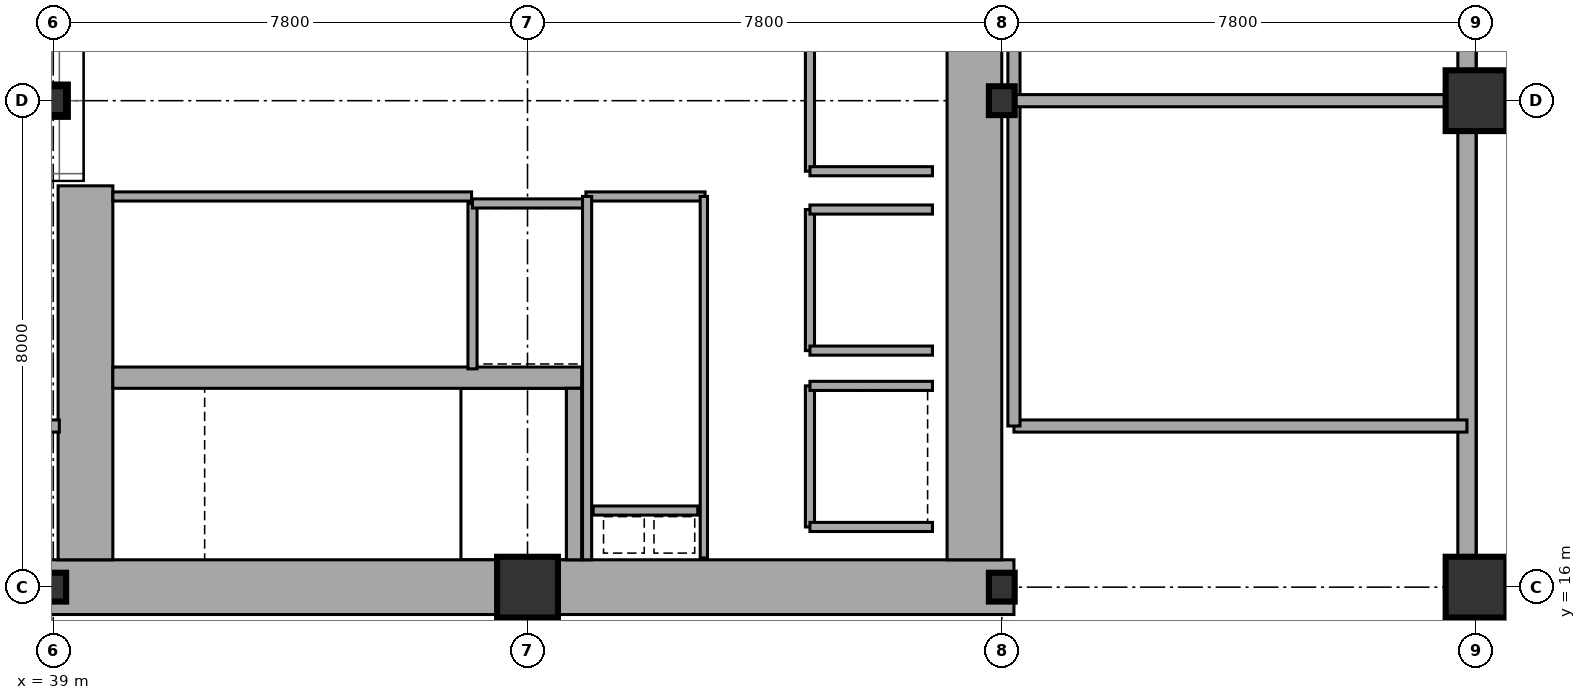
"""IFC4 building model, lengths in metres.
Left out: names, types, materials, properties, quantities, classifications, styles, units other than length and angle.
Written with IfcOpenShell. Run it as: python <this file> out.ifc"""

import sys

from ifc_helpers import new_model, si_unit, direction, frame, frame_2d, origin, origin_2d, place, context, subcontext, project, spatial, rectangle, i_section, extrude, element, fill, save


model = new_model("IFC4")
c1 = context("Model", 3, precision=1e-05, world=origin(), true_north=direction((0.0, 1.0)))
c2 = subcontext(c1, "Body", "Model", "MODEL_VIEW")
j1 = project(units=[si_unit("LENGTHUNIT", "METRE"), si_unit("PLANEANGLEUNIT", "RADIAN")], contexts=[c1])
p1 = place(None, origin())
s1 = spatial("IfcSite", under=j1, at=p1, CompositionType="ELEMENT")
p2 = place(p1, origin())
s2 = spatial("IfcBuilding", under=s1, at=p2, CompositionType="ELEMENT")
p3 = place(p2, origin())
s3 = spatial("IfcBuildingStorey", under=s2, at=p3, CompositionType="ELEMENT", Elevation=0.0)
p4 = place(p3, frame((38.8, 16.0, 0.0), z_axis=(0.0, 0.0, 1.0), x_axis=(1.0, 0.0, 0.0)))
e1 = element("IfcWall", 1, at=p4, inside=s3, PredefinedType="SHEAR", context=c2, shape_type="SweptSolid", body=[
    extrude(rectangle(XDim=16.0, YDim=0.9, at=frame_2d((8.0, 0.0))), origin(), (0.0, 0.0, 1.0), 5.12),
])
p5 = place(p3, frame((39.53, 16.45, 0.0), z_axis=(0.0, 0.0, 1.0), x_axis=(0.0, 1.0, 0.0)))
e2 = element("IfcWall", 2, at=p5, inside=s3, PredefinedType="SHEAR", context=c2, shape_type="SweptSolid", body=[
    extrude(rectangle(XDim=6.15, YDim=0.9, at=frame_2d((3.075, 0.0))), origin(), (0.0, 0.0, 1.0), 5.12),
])
p6 = place(p5, frame((0.35, 0.0, 0.0)))
e3 = element("IfcOpeningElement", 3, at=p6, cuts=e2, PredefinedType="OPENING", context=c2, shape_type="SweptSolid", body=[
    extrude(rectangle(XDim=1.1, YDim=2.15, at=frame_2d((0.55, 1.075))), frame((0.0, 0.46, 0.0), z_axis=(0.0, -1.0, 0.0), x_axis=(1.0, 0.0, 0.0)), (0.0, 0.0, 1.0), 0.92),
])
p7 = place(p3, frame((54.15, 16.45, 0.0), z_axis=(0.0, 0.0, 1.0), x_axis=(0.0, 1.0, 0.0)))
e4 = element("IfcWall", 4, at=p7, inside=s3, PredefinedType="SHEAR", context=c2, shape_type="SweptSolid", body=[
    extrude(rectangle(XDim=15.1, YDim=0.9, at=frame_2d((7.55, 0.0))), origin(), (0.0, 0.0, 1.0), 5.12),
])
p8 = place(p3, frame((39.98, 19.445, 0.0), z_axis=(0.0, 0.0, 1.0), x_axis=(1.0, 0.0, 0.0)))
e5 = element("IfcWall", 5, at=p8, inside=s3, PredefinedType="SHEAR", context=c2, shape_type="SweptSolid", body=[
    extrude(rectangle(XDim=7.71, YDim=0.35, at=frame_2d((3.855, 0.0))), origin(), (0.0, 0.0, 1.0), 5.12),
])
p9 = place(p8, frame((0.25, 0.0, 0.0)))
e6 = element("IfcOpeningElement", 6, at=p9, cuts=e5, PredefinedType="OPENING", context=c2, shape_type="SweptSolid", body=[
    extrude(rectangle(XDim=1.1, YDim=2.15, at=frame_2d((0.55, 1.075))), frame((0.0, 0.185, 0.0), z_axis=(0.0, -1.0, 0.0), x_axis=(1.0, 0.0, 0.0)), (0.0, 0.0, 1.0), 0.37),
])
p10 = place(p3, frame((47.565, 16.45, 0.0), z_axis=(0.0, 0.0, 1.0), x_axis=(0.0, 1.0, 0.0)))
e7 = element("IfcWall", 7, at=p10, inside=s3, PredefinedType="SHEAR", context=c2, shape_type="SweptSolid", body=[
    extrude(rectangle(XDim=2.82, YDim=0.25, at=frame_2d((1.41, 0.0))), origin(), (0.0, 0.0, 1.0), 5.12),
])
for number, where, z_axis, x_axis in (
    (8, (39.0, 16.0, 0.0), (0.0, 0.0, 1.0), (1.0, 0.0, 0.0)),
    (9, (39.0, 24.0, 0.0), (0.0, 0.0, 1.0), (1.0, 0.0, 0.0)),
):
    element("IfcColumn", number, at=place(p3, frame(where, z_axis=z_axis, x_axis=x_axis)), inside=s3, PredefinedType="COLUMN", context=c2, shape_type="SweptSolid", body=[
        extrude(i_section(OverallWidth=0.424, OverallDepth=0.474, WebThickness=0.048, FlangeThickness=0.077, at=origin_2d()), origin(), (0.0, 0.0, 1.0), 5.395),
    ])
p11 = place(p3, frame((46.8, 16.0, 0.0), z_axis=(0.0, 0.0, 1.0), x_axis=(1.0, 0.0, 0.0)))
e10 = element("IfcColumn", 10, at=p11, inside=s3, PredefinedType="COLUMN", context=c2, shape_type="SweptSolid", body=[
    extrude(rectangle(XDim=1.0, YDim=1.0, at=origin_2d()), origin(), (0.0, 0.0, 1.0), 5.395),
])
for number, where, z_axis, x_axis in (
    (11, (54.6, 16.0, 0.0), (0.0, 0.0, 1.0), (1.0, 0.0, 0.0)),
    (12, (54.6, 24.0, 0.0), (0.0, 0.0, 1.0), (1.0, 0.0, 0.0)),
):
    element("IfcColumn", number, at=place(p3, frame(where, z_axis=z_axis, x_axis=x_axis)), inside=s3, PredefinedType="COLUMN", context=c2, shape_type="SweptSolid", body=[
        extrude(i_section(OverallWidth=0.424, OverallDepth=0.474, WebThickness=0.048, FlangeThickness=0.077, at=origin_2d()), origin(), (0.0, 0.0, 1.0), 5.395),
    ])
for number, where, z_axis, x_axis in (
    (13, (62.4, 16.0, 0.0), (0.0, 0.0, 1.0), (1.0, 0.0, 0.0)),
    (14, (62.4, 24.0, 0.0), (0.0, 0.0, 1.0), (1.0, 0.0, 0.0)),
):
    element("IfcColumn", number, at=place(p3, frame(where, z_axis=z_axis, x_axis=x_axis)), inside=s3, PredefinedType="COLUMN", context=c2, shape_type="SweptSolid", body=[
        extrude(rectangle(XDim=1.0, YDim=1.0, at=origin_2d()), origin(), (0.0, 0.0, 1.0), 5.395),
    ])
p12 = place(p3, frame((62.25, 16.51, 0.0), z_axis=(0.0, 0.0, 1.0), x_axis=(0.0, 1.0, 0.0)))
e15 = element("IfcWall", 15, at=p12, inside=s3, PredefinedType="STANDARD", context=c2, shape_type="SweptSolid", body=[
    extrude(rectangle(XDim=6.98, YDim=0.3, at=frame_2d((3.49, 0.0))), origin(), (0.0, 0.0, 1.0), 4.648),
])
p13 = place(p12, frame((0.22, 0.0, 0.0)))
e16 = element("IfcOpeningElement", 16, at=p13, cuts=e15, PredefinedType="OPENING", context=c2, shape_type="SweptSolid", body=[
    extrude(rectangle(XDim=1.8, YDim=2.2, at=frame_2d((0.9, 1.1))), frame((0.0, 0.16, 0.0), z_axis=(0.0, -1.0, 0.0), x_axis=(1.0, 0.0, 0.0)), (0.0, 0.0, 1.0), 0.32),
])
p14 = place(p12, frame((3.4, 0.0, 0.0)))
e17 = element("IfcOpeningElement", 17, at=p14, cuts=e15, PredefinedType="OPENING", context=c2, shape_type="SweptSolid", body=[
    extrude(rectangle(XDim=1.8, YDim=2.2, at=frame_2d((0.9, 1.1))), frame((0.0, 0.16, 0.0), z_axis=(0.0, -1.0, 0.0), x_axis=(1.0, 0.0, 0.0)), (0.0, 0.0, 1.0), 0.32),
])
p15 = place(p3, frame((62.25, 24.51, 0.0), z_axis=(0.0, 0.0, 1.0), x_axis=(0.0, 1.0, 0.0)))
e18 = element("IfcWall", 18, at=p15, inside=s3, PredefinedType="STANDARD", context=c2, shape_type="SweptSolid", body=[
    extrude(rectangle(XDim=6.98, YDim=0.3, at=frame_2d((3.49, 0.0))), origin(), (0.0, 0.0, 1.0), 4.648),
])
p16 = place(p15, frame((4.55, 0.0, 0.0)))
e19 = element("IfcOpeningElement", 19, at=p16, cuts=e18, PredefinedType="OPENING", context=c2, shape_type="SweptSolid", body=[
    extrude(rectangle(XDim=1.8, YDim=2.2, at=frame_2d((0.9, 1.1))), frame((0.0, 0.16, 0.0), z_axis=(0.0, -1.0, 0.0), x_axis=(1.0, 0.0, 0.0)), (0.0, 0.0, 1.0), 0.32),
])
p17 = place(p3, frame((39.98, 22.425, 0.0), z_axis=(0.0, 0.0, 1.0), x_axis=(1.0, 0.0, 0.0)))
e20 = element("IfcWall", 20, at=p17, inside=s3, PredefinedType="PARTITIONING", context=c2, shape_type="SweptSolid", body=[
    extrude(rectangle(XDim=5.9, YDim=0.15, at=frame_2d((2.95, 0.0))), origin(), (0.0, 0.0, 1.0), 5.12),
])
p18 = place(p17, frame((2.35, 0.0, 0.0)))
e21 = element("IfcOpeningElement", 21, at=p18, cuts=e20, PredefinedType="OPENING", context=c2, shape_type="SweptSolid", body=[
    extrude(rectangle(XDim=1.05, YDim=2.15, at=frame_2d((0.525, 1.075))), frame((0.0, 0.085, 0.0), z_axis=(0.0, -1.0, 0.0), x_axis=(1.0, 0.0, 0.0)), (0.0, 0.0, 1.0), 0.17),
])
p19 = place(p3, frame((45.895, 19.59, 0.0), z_axis=(0.0, 0.0, 1.0), x_axis=(0.0, 1.0, 0.0)))
e22 = element("IfcWall", 22, at=p19, inside=s3, PredefinedType="PARTITIONING", context=c2, shape_type="SweptSolid", body=[
    extrude(rectangle(XDim=2.72, YDim=0.15, at=frame_2d((1.36, 0.0))), origin(), (0.0, 0.0, 1.0), 5.12),
])
p20 = place(p19, frame((0.81, 0.0, 0.0)))
e23 = element("IfcOpeningElement", 23, at=p20, cuts=e22, PredefinedType="OPENING", context=c2, shape_type="SweptSolid", body=[
    extrude(rectangle(XDim=1.1, YDim=2.15, at=frame_2d((0.55, 1.075))), frame((0.0, 0.085, 0.0), z_axis=(0.0, -1.0, 0.0), x_axis=(1.0, 0.0, 0.0)), (0.0, 0.0, 1.0), 0.17),
])
p21 = place(p3, frame((45.895, 22.31, 0.0), z_axis=(0.0, 0.0, 1.0), x_axis=(1.0, 0.0, 0.0)))
e24 = element("IfcWall", 24, at=p21, inside=s3, PredefinedType="PARTITIONING", context=c2, shape_type="SweptSolid", body=[
    extrude(rectangle(XDim=1.915, YDim=0.15, at=frame_2d((0.958, 0.0))), origin(), (0.0, 0.0, 1.0), 5.12),
])
p22 = place(p3, frame((51.445, 19.89, 0.0), z_axis=(0.0, 0.0, 1.0), x_axis=(0.0, 1.0, 0.0)))
e25 = element("IfcWall", 25, at=p22, inside=s3, PredefinedType="PARTITIONING", context=c2, shape_type="SweptSolid", body=[
    extrude(rectangle(XDim=2.32, YDim=0.15, at=frame_2d((1.16, 0.0))), origin(), (0.0, 0.0, 1.0), 5.12),
])
p23 = place(p22, frame((0.61, 0.0, 0.0)))
e26 = element("IfcOpeningElement", 26, at=p23, cuts=e25, PredefinedType="OPENING", context=c2, shape_type="SweptSolid", body=[
    extrude(rectangle(XDim=1.1, YDim=2.15, at=frame_2d((0.55, 1.075))), frame((0.0, 0.085, 0.0), z_axis=(0.0, -1.0, 0.0), x_axis=(1.0, 0.0, 0.0)), (0.0, 0.0, 1.0), 0.17),
])
for number, where, z_axis, x_axis in (
    (27, (51.445, 19.89, 0.0), (0.0, 0.0, 1.0), (1.0, 0.0, 0.0)),
    (28, (51.445, 22.21, 0.0), (0.0, 0.0, 1.0), (1.0, 0.0, 0.0)),
):
    element("IfcWall", number, at=place(p3, frame(where, z_axis=z_axis, x_axis=x_axis)), inside=s3, PredefinedType="PARTITIONING", context=c2, shape_type="SweptSolid", body=[
        extrude(rectangle(XDim=2.015, YDim=0.15, at=frame_2d((1.007, 0.0))), origin(), (0.0, 0.0, 1.0), 5.12),
    ])
p24 = place(p3, frame((51.445, 22.84, 0.0), z_axis=(0.0, 0.0, 1.0), x_axis=(0.0, 1.0, 0.0)))
e29 = element("IfcWall", 29, at=p24, inside=s3, PredefinedType="PARTITIONING", context=c2, shape_type="SweptSolid", body=[
    extrude(rectangle(XDim=2.32, YDim=0.15, at=frame_2d((1.16, 0.0))), origin(), (0.0, 0.0, 1.0), 5.12),
])
p25 = place(p24, frame((0.61, 0.0, 0.0)))
e30 = element("IfcOpeningElement", 30, at=p25, cuts=e29, PredefinedType="OPENING", context=c2, shape_type="SweptSolid", body=[
    extrude(rectangle(XDim=1.1, YDim=2.15, at=frame_2d((0.55, 1.075))), frame((0.0, 0.085, 0.0), z_axis=(0.0, -1.0, 0.0), x_axis=(1.0, 0.0, 0.0)), (0.0, 0.0, 1.0), 0.17),
])
p26 = place(p3, frame((51.445, 22.84, 0.0), z_axis=(0.0, 0.0, 1.0), x_axis=(1.0, 0.0, 0.0)))
e31 = element("IfcWall", 31, at=p26, inside=s3, PredefinedType="PARTITIONING", context=c2, shape_type="SweptSolid", body=[
    extrude(rectangle(XDim=2.015, YDim=0.15, at=frame_2d((1.007, 0.0))), origin(), (0.0, 0.0, 1.0), 5.12),
])
p27 = place(p3, frame((51.445, 16.99, 0.0), z_axis=(0.0, 0.0, 1.0), x_axis=(0.0, 1.0, 0.0)))
e32 = element("IfcWall", 32, at=p27, inside=s3, PredefinedType="PARTITIONING", context=c2, shape_type="SweptSolid", body=[
    extrude(rectangle(XDim=2.32, YDim=0.15, at=frame_2d((1.16, 0.0))), origin(), (0.0, 0.0, 1.0), 5.12),
])
p28 = place(p27, frame((0.61, 0.0, 0.0)))
e33 = element("IfcOpeningElement", 33, at=p28, cuts=e32, PredefinedType="OPENING", context=c2, shape_type="SweptSolid", body=[
    extrude(rectangle(XDim=1.1, YDim=2.15, at=frame_2d((0.55, 1.075))), frame((0.0, 0.085, 0.0), z_axis=(0.0, -1.0, 0.0), x_axis=(1.0, 0.0, 0.0)), (0.0, 0.0, 1.0), 0.17),
])
for number, where, z_axis, x_axis in (
    (34, (51.445, 16.99, 0.0), (0.0, 0.0, 1.0), (1.0, 0.0, 0.0)),
    (35, (51.445, 19.31, 0.0), (0.0, 0.0, 1.0), (1.0, 0.0, 0.0)),
):
    element("IfcWall", number, at=place(p3, frame(where, z_axis=z_axis, x_axis=x_axis)), inside=s3, PredefinedType="PARTITIONING", context=c2, shape_type="SweptSolid", body=[
        extrude(rectangle(XDim=2.015, YDim=0.15, at=frame_2d((1.007, 0.0))), origin(), (0.0, 0.0, 1.0), 5.12),
    ])
p29 = place(p3, frame((47.88, 17.26, 0.0), z_axis=(0.0, 0.0, 1.0), x_axis=(1.0, 0.0, 0.0)))
e36 = element("IfcWall", 36, at=p29, inside=s3, PredefinedType="PARTITIONING", context=c2, shape_type="SweptSolid", body=[
    extrude(rectangle(XDim=1.72, YDim=0.15, at=frame_2d((0.86, 0.0))), origin(), (0.0, 0.0, 1.0), 5.12),
])
p30 = place(p29, frame((0.42, 0.0, 0.0)))
e37 = element("IfcOpeningElement", 37, at=p30, cuts=e36, PredefinedType="OPENING", context=c2, shape_type="SweptSolid", body=[
    extrude(rectangle(XDim=0.85, YDim=2.15, at=frame_2d((0.425, 1.075))), frame((0.0, 0.085, 0.0), z_axis=(0.0, -1.0, 0.0), x_axis=(1.0, 0.0, 0.0)), (0.0, 0.0, 1.0), 0.17),
])
p31 = place(p3, frame((47.76, 22.425, 0.0), z_axis=(0.0, 0.0, 1.0), x_axis=(1.0, 0.0, 0.0)))
e38 = element("IfcWall", 38, at=p31, inside=s3, PredefinedType="PARTITIONING", context=c2, shape_type="SweptSolid", body=[
    extrude(rectangle(XDim=1.96, YDim=0.15, at=frame_2d((0.98, 0.0))), origin(), (0.0, 0.0, 1.0), 5.12),
])
p32 = place(p3, frame((47.78, 16.45, 0.0), z_axis=(0.0, 0.0, 1.0), x_axis=(0.0, 1.0, 0.0)))
e39 = element("IfcWall", 39, at=p32, inside=s3, PredefinedType="PARTITIONING", context=c2, shape_type="SweptSolid", body=[
    extrude(rectangle(XDim=5.975, YDim=0.15, at=frame_2d((2.988, 0.0))), origin(), (0.0, 0.0, 1.0), 5.12),
])
p33 = place(p3, frame((49.7, 16.48, 0.0), z_axis=(0.0, 0.0, 1.0), x_axis=(0.0, 1.0, 0.0)))
e40 = element("IfcWall", 40, at=p33, inside=s3, PredefinedType="PARTITIONING", context=c2, shape_type="SweptSolid", body=[
    extrude(rectangle(XDim=5.945, YDim=0.12, at=frame_2d((2.973, 0.0))), origin(), (0.0, 0.0, 1.0), 5.12),
])
p34 = place(p33, frame((3.35, 0.0, 0.0)))
e41 = element("IfcOpeningElement", 41, at=p34, cuts=e40, PredefinedType="OPENING", context=c2, shape_type="SweptSolid", body=[
    extrude(rectangle(XDim=0.95, YDim=2.15, at=frame_2d((0.475, 1.075))), frame((0.0, 0.07, 0.0), z_axis=(0.0, -1.0, 0.0), x_axis=(1.0, 0.0, 0.0)), (0.0, 0.0, 1.0), 0.14),
])
p35 = place(p3, frame((37.3, 18.65, 0.0), z_axis=(0.0, 0.0, 1.0), x_axis=(1.0, 0.0, 0.0)))
e42 = element("IfcWall", 42, at=p35, inside=s3, PredefinedType="SOLIDWALL", context=c2, shape_type="SweptSolid", body=[
    extrude(rectangle(XDim=1.8, YDim=0.2, at=frame_2d((0.9, 0.0))), origin(), (0.0, 0.0, 1.0), 4.415),
])
p36 = place(p3, frame((54.8, 18.65, 0.0), z_axis=(0.0, 0.0, 1.0), x_axis=(1.0, 0.0, 0.0)))
e43 = element("IfcWall", 43, at=p36, inside=s3, PredefinedType="SOLIDWALL", context=c2, shape_type="SweptSolid", body=[
    extrude(rectangle(XDim=7.45, YDim=0.2, at=frame_2d((3.725, 0.0))), origin(), (0.0, 0.0, 1.0), 5.12),
])
p37 = place(p3, frame((54.8, 18.65, 0.0), z_axis=(0.0, 0.0, 1.0), x_axis=(0.0, 1.0, 0.0)))
e44 = element("IfcWall", 44, at=p37, inside=s3, PredefinedType="SOLIDWALL", context=c2, shape_type="SweptSolid", body=[
    extrude(rectangle(XDim=9.95, YDim=0.2, at=frame_2d((4.975, 0.0))), origin(), (0.0, 0.0, 1.0), 4.338),
])
p38 = place(p3, frame((54.8, 24.0, 0.0), z_axis=(0.0, 0.0, 1.0), x_axis=(1.0, 0.0, 0.0)))
e45 = element("IfcWall", 45, at=p38, inside=s3, PredefinedType="SOLIDWALL", context=c2, shape_type="SweptSolid", body=[
    extrude(rectangle(XDim=7.45, YDim=0.2, at=frame_2d((3.725, 0.0))), origin(), (0.0, 0.0, 1.0), 4.338),
])
p39 = place(p38, frame((2.8, 0.0, 0.0)))
e46 = element("IfcOpeningElement", 46, at=p39, cuts=e45, PredefinedType="OPENING", context=c2, shape_type="SweptSolid", body=[
    extrude(rectangle(XDim=1.05, YDim=2.15, at=frame_2d((0.525, 1.075))), frame((0.0, 0.11, 0.0), z_axis=(0.0, -1.0, 0.0), x_axis=(1.0, 0.0, 0.0)), (0.0, 0.0, 1.0), 0.22),
])
p40 = place(p13, frame((1.8, 0.0, 0.0), z_axis=(0.0, 0.0, 1.0), x_axis=(-1.0, 0.0, 0.0)))
e47 = element("IfcDoor", 47, at=p40, inside=s3, OperationType="SINGLE_SWING_LEFT", PredefinedType="DOOR", context=c2, shape_type="SweptSolid", body=[
    extrude(rectangle(XDim=1.8, YDim=2.2, at=frame_2d((0.9, 1.1))), frame((0.0, 0.025, 0.0), z_axis=(0.0, -1.0, 0.0), x_axis=(1.0, 0.0, 0.0)), (0.0, 0.0, 1.0), 0.05),
])
fill(e16, e47)
p41 = place(p14, frame((1.8, 0.0, 0.0), z_axis=(0.0, 0.0, 1.0), x_axis=(-1.0, 0.0, 0.0)))
e48 = element("IfcDoor", 48, at=p41, inside=s3, OperationType="SINGLE_SWING_LEFT", PredefinedType="DOOR", context=c2, shape_type="SweptSolid", body=[
    extrude(rectangle(XDim=1.8, YDim=2.2, at=frame_2d((0.9, 1.1))), frame((0.0, 0.025, 0.0), z_axis=(0.0, -1.0, 0.0), x_axis=(1.0, 0.0, 0.0)), (0.0, 0.0, 1.0), 0.05),
])
fill(e17, e48)
p42 = place(p18, frame((1.05, 0.0, 0.0), z_axis=(0.0, 0.0, 1.0), x_axis=(-1.0, 0.0, 0.0)))
e49 = element("IfcDoor", 49, at=p42, inside=s3, OperationType="SINGLE_SWING_RIGHT", PredefinedType="DOOR", context=c2, shape_type="SweptSolid", body=[
    extrude(rectangle(XDim=1.05, YDim=2.15, at=frame_2d((0.525, 1.075))), frame((0.0, 0.025, 0.0), z_axis=(0.0, -1.0, 0.0), x_axis=(1.0, 0.0, 0.0)), (0.0, 0.0, 1.0), 0.05),
])
fill(e21, e49)
p43 = place(p20, frame((1.1, 0.0, 0.0), z_axis=(0.0, 0.0, 1.0), x_axis=(-1.0, 0.0, 0.0)))
e50 = element("IfcDoor", 50, at=p43, inside=s3, OperationType="DOUBLE_DOOR_SLIDING", PredefinedType="DOOR", context=c2, shape_type="SweptSolid", body=[
    extrude(rectangle(XDim=1.1, YDim=2.15, at=frame_2d((0.55, 1.075))), frame((0.0, 0.025, 0.0), z_axis=(0.0, -1.0, 0.0), x_axis=(1.0, 0.0, 0.0)), (0.0, 0.0, 1.0), 0.05),
])
fill(e23, e50)
p44 = place(p23, frame((1.1, 0.0, 0.0), z_axis=(0.0, 0.0, 1.0), x_axis=(-1.0, 0.0, 0.0)))
e51 = element("IfcDoor", 51, at=p44, inside=s3, OperationType="DOUBLE_DOOR_SLIDING", PredefinedType="DOOR", context=c2, shape_type="SweptSolid", body=[
    extrude(rectangle(XDim=1.1, YDim=2.15, at=frame_2d((0.55, 1.075))), frame((0.0, 0.025, 0.0), z_axis=(0.0, -1.0, 0.0), x_axis=(1.0, 0.0, 0.0)), (0.0, 0.0, 1.0), 0.05),
])
fill(e26, e51)
p45 = place(p25, frame((1.1, 0.0, 0.0), z_axis=(0.0, 0.0, 1.0), x_axis=(-1.0, 0.0, 0.0)))
e52 = element("IfcDoor", 52, at=p45, inside=s3, OperationType="DOUBLE_DOOR_SLIDING", PredefinedType="DOOR", context=c2, shape_type="SweptSolid", body=[
    extrude(rectangle(XDim=1.1, YDim=2.15, at=frame_2d((0.55, 1.075))), frame((0.0, 0.025, 0.0), z_axis=(0.0, -1.0, 0.0), x_axis=(1.0, 0.0, 0.0)), (0.0, 0.0, 1.0), 0.05),
])
fill(e30, e52)
p46 = place(p28, frame((1.1, 0.0, 0.0), z_axis=(0.0, 0.0, 1.0), x_axis=(-1.0, 0.0, 0.0)))
e53 = element("IfcDoor", 53, at=p46, inside=s3, OperationType="DOUBLE_DOOR_SLIDING", PredefinedType="DOOR", context=c2, shape_type="SweptSolid", body=[
    extrude(rectangle(XDim=1.1, YDim=2.15, at=frame_2d((0.55, 1.075))), frame((0.0, 0.025, 0.0), z_axis=(0.0, -1.0, 0.0), x_axis=(1.0, 0.0, 0.0)), (0.0, 0.0, 1.0), 0.05),
])
fill(e33, e53)
p47 = place(p30, origin())
e54 = element("IfcDoor", 54, at=p47, inside=s3, OperationType="SINGLE_SWING_LEFT", PredefinedType="TRAPDOOR", context=c2, shape_type="SweptSolid", body=[
    extrude(rectangle(XDim=0.85, YDim=2.15, at=frame_2d((0.425, 1.075))), frame((0.0, 0.025, 0.0), z_axis=(0.0, -1.0, 0.0), x_axis=(1.0, 0.0, 0.0)), (0.0, 0.0, 1.0), 0.05),
])
fill(e37, e54)
p48 = place(p34, frame((0.95, 0.0, 0.0), z_axis=(0.0, 0.0, 1.0), x_axis=(-1.0, 0.0, 0.0)))
e55 = element("IfcDoor", 55, at=p48, inside=s3, OperationType="SINGLE_SWING_LEFT", PredefinedType="DOOR", context=c2, shape_type="SweptSolid", body=[
    extrude(rectangle(XDim=0.95, YDim=2.15, at=frame_2d((0.475, 1.075))), frame((0.0, 0.025, 0.0), z_axis=(0.0, -1.0, 0.0), x_axis=(1.0, 0.0, 0.0)), (0.0, 0.0, 1.0), 0.05),
])
fill(e41, e55)
p49 = place(p39, origin())
e56 = element("IfcDoor", 56, at=p49, inside=s3, OperationType="SINGLE_SWING_LEFT", PredefinedType="DOOR", context=c2, shape_type="SweptSolid", body=[
    extrude(rectangle(XDim=1.05, YDim=2.15, at=frame_2d((0.525, 1.075))), frame((0.0, 0.025, 0.0), z_axis=(0.0, -1.0, 0.0), x_axis=(1.0, 0.0, 0.0)), (0.0, 0.0, 1.0), 0.05),
])
fill(e46, e56)
p50 = place(p9, frame((1.1, 0.0, 0.0), z_axis=(0.0, 0.0, 1.0), x_axis=(-1.0, 0.0, 0.0)))
e57 = element("IfcDoor", 57, at=p50, inside=s3, OperationType="SINGLE_SWING_RIGHT", PredefinedType="DOOR", context=c2, shape_type="SweptSolid", body=[
    extrude(rectangle(XDim=1.1, YDim=2.15, at=frame_2d((0.55, 1.075))), frame((0.0, 0.025, 0.0), z_axis=(0.0, -1.0, 0.0), x_axis=(1.0, 0.0, 0.0)), (0.0, 0.0, 1.0), 0.05),
])
fill(e6, e57)
p51 = place(p6, frame((1.1, 0.0, 0.0), z_axis=(0.0, 0.0, 1.0), x_axis=(-1.0, 0.0, 0.0)))
e58 = element("IfcDoor", 58, at=p51, inside=s3, OperationType="SINGLE_SWING_RIGHT", PredefinedType="DOOR", context=c2, shape_type="SweptSolid", body=[
    extrude(rectangle(XDim=1.1, YDim=2.15, at=frame_2d((0.55, 1.075))), frame((0.0, 0.025, 0.0), z_axis=(0.0, -1.0, 0.0), x_axis=(1.0, 0.0, 0.0)), (0.0, 0.0, 1.0), 0.05),
])
fill(e3, e58)
save(model, sys.argv[1])
